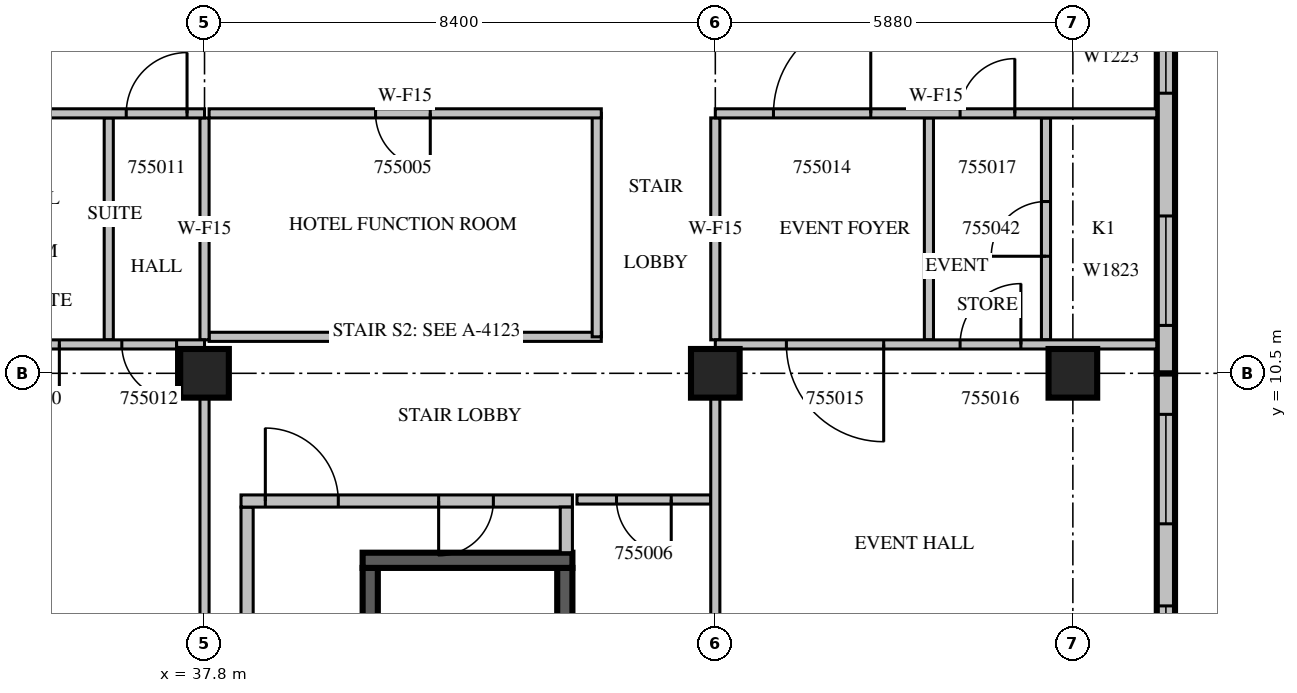
"""IFC4 building model, lengths in metres.
Left out: names, types, materials, properties, quantities, classifications, styles, units other than length and angle.
Written with IfcOpenShell. Run it as: python <this file> out.ifc"""

import sys

from ifc_helpers import new_model, si_unit, direction, frame, frame_2d, origin, origin_2d, place, context, subcontext, project, spatial, rectangle, extrude, source, transform, mapped, element, fill, save


model = new_model("IFC4")
c1 = context("Model", 3, precision=1e-05, world=origin(), true_north=direction((0.0, 1.0)))
c2 = subcontext(c1, "Body", "Model", "MODEL_VIEW")
j1 = project(units=[si_unit("LENGTHUNIT", "METRE"), si_unit("PLANEANGLEUNIT", "RADIAN")], contexts=[c1])
p1 = place(None, origin())
s1 = spatial("IfcSite", under=j1, at=p1, CompositionType="ELEMENT")
p2 = place(p1, origin())
s2 = spatial("IfcBuilding", under=s1, at=p2, CompositionType="ELEMENT")
p3 = place(p2, frame((0.0, 0.0, 242.4)))
s3 = spatial("IfcBuildingStorey", under=s2, at=p3, CompositionType="ELEMENT", Elevation=242.4)
m1 = source(origin(), c2, "Body", "SweptSolid", [
    extrude(rectangle(XDim=0.8, YDim=0.8, at=origin_2d()), origin(), (0.0, 0.0, 1.0), 3.8),
])
for number, where, z_axis, x_axis in (
    (1, (37.8, 10.5, 0.0), (0.0, 0.0, 1.0), (1.0, 0.0, 0.0)),
    (2, (46.2, 10.5, 0.0), (0.0, 0.0, 1.0), (1.0, 0.0, 0.0)),
    (3, (52.08, 10.5, 0.0), (0.0, 0.0, 1.0), (1.0, 0.0, 0.0)),
):
    element("IfcColumn", number, at=place(p3, frame(where, z_axis=z_axis, x_axis=x_axis)), inside=s3, PredefinedType="COLUMN", context=c2, shape_type="MappedRepresentation", body=[
        mapped(m1, transform((0.0, 0.0, 0.0), scale=1.0)),
    ])
m2 = source(origin(), c2, "Body", "SweptSolid", [
    extrude(rectangle(XDim=6.3, YDim=0.3, at=frame_2d((3.15, 0.0))), origin(), (0.0, 0.0, 1.0), 3.4),
])
p4 = place(p3, frame((53.61, 4.2, 0.0), z_axis=(0.0, 0.0, 1.0), x_axis=(0.0, 1.0, 0.0)))
e4 = element("IfcWall", 4, at=p4, inside=s3, PredefinedType="STANDARD", context=c2, shape_type="MappedRepresentation", body=[
    mapped(m2, transform((0.0, 0.0, 0.0), scale=1.0)),
])
m3 = source(origin(), c2, "Body", "SweptSolid", [
    extrude(rectangle(XDim=1.8, YDim=2.3, at=frame_2d((0.9, 1.15))), frame((0.0, 0.16, 0.0), z_axis=(0.0, -1.0, 0.0), x_axis=(1.0, 0.0, 0.0)), (0.0, 0.0, 1.0), 0.32),
])
p5 = place(p4, frame((0.675, 0.0, 0.6)))
e5 = element("IfcOpeningElement", 5, at=p5, cuts=e4, PredefinedType="OPENING", context=c2, shape_type="MappedRepresentation", body=[
    mapped(m3, transform((0.0, 0.0, 0.0), scale=1.0)),
])
p6 = place(p4, frame((3.825, 0.0, 0.6)))
e6 = element("IfcOpeningElement", 6, at=p6, cuts=e4, PredefinedType="OPENING", context=c2, shape_type="MappedRepresentation", body=[
    mapped(m3, transform((0.0, 0.0, 0.0), scale=1.0)),
])
m4 = source(origin(), c2, "Body", "SweptSolid", [
    extrude(rectangle(XDim=6.75, YDim=0.3, at=frame_2d((3.375, 0.0))), origin(), (0.0, 0.0, 1.0), 3.4),
])
p7 = place(p3, frame((53.61, 10.5, 0.0), z_axis=(0.0, 0.0, 1.0), x_axis=(0.0, 1.0, 0.0)))
e7 = element("IfcWall", 7, at=p7, inside=s3, PredefinedType="STANDARD", context=c2, shape_type="MappedRepresentation", body=[
    mapped(m4, transform((0.0, 0.0, 0.0), scale=1.0)),
])
p8 = place(p7, frame((0.787, 0.0, 0.6)))
e8 = element("IfcOpeningElement", 8, at=p8, cuts=e7, PredefinedType="OPENING", context=c2, shape_type="MappedRepresentation", body=[
    mapped(m3, transform((0.0, 0.0, 0.0), scale=1.0)),
])
m5 = source(origin(), c2, "Body", "SweptSolid", [
    extrude(rectangle(XDim=1.2, YDim=2.3, at=frame_2d((0.6, 1.15))), frame((0.0, 0.16, 0.0), z_axis=(0.0, -1.0, 0.0), x_axis=(1.0, 0.0, 0.0)), (0.0, 0.0, 1.0), 0.32),
])
p9 = place(p7, frame((4.606, 0.0, 0.6)))
e9 = element("IfcOpeningElement", 9, at=p9, cuts=e7, PredefinedType="OPENING", context=c2, shape_type="MappedRepresentation", body=[
    mapped(m5, transform((0.0, 0.0, 0.0), scale=1.0)),
])
m6 = source(origin(), c2, "Body", "SweptSolid", [
    extrude(rectangle(XDim=7.0, YDim=0.25, at=frame_2d((3.5, 0.0))), origin(), (0.0, 0.0, 1.0), 3.4),
])
p10 = place(p3, frame((40.525, 0.3, 0.0), z_axis=(0.0, 0.0, 1.0), x_axis=(0.0, 1.0, 0.0)))
e10 = element("IfcWall", 10, at=p10, inside=s3, PredefinedType="SOLIDWALL", context=c2, shape_type="MappedRepresentation", body=[
    mapped(m6, transform((0.0, 0.0, 0.0), scale=1.0)),
])
m7 = source(origin(), c2, "Body", "SweptSolid", [
    extrude(rectangle(XDim=1.1, YDim=2.1, at=frame_2d((0.55, 1.05))), frame((0.0, 0.135, 0.0), z_axis=(0.0, -1.0, 0.0), x_axis=(1.0, 0.0, 0.0)), (0.0, 0.0, 1.0), 0.27),
])
p11 = place(p10, frame((0.55, 0.0, 0.0)))
e11 = element("IfcOpeningElement", 11, at=p11, cuts=e10, PredefinedType="OPENING", context=c2, shape_type="MappedRepresentation", body=[
    mapped(m7, transform((0.0, 0.0, 0.0), scale=1.0)),
])
p12 = place(p3, frame((43.725, 0.3, 0.0), z_axis=(0.0, 0.0, 1.0), x_axis=(0.0, 1.0, 0.0)))
e12 = element("IfcWall", 12, at=p12, inside=s3, PredefinedType="SOLIDWALL", context=c2, shape_type="MappedRepresentation", body=[
    mapped(m6, transform((0.0, 0.0, 0.0), scale=1.0)),
])
m8 = source(origin(), c2, "Body", "SweptSolid", [
    extrude(rectangle(XDim=3.45, YDim=0.25, at=frame_2d((1.725, 0.0))), origin(), (0.0, 0.0, 1.0), 3.4),
])
p13 = place(p3, frame((40.4, 7.425, 0.0), z_axis=(0.0, 0.0, 1.0), x_axis=(1.0, 0.0, 0.0)))
e13 = element("IfcWall", 13, at=p13, inside=s3, PredefinedType="SOLIDWALL", context=c2, shape_type="MappedRepresentation", body=[
    mapped(m8, transform((0.0, 0.0, 0.0), scale=1.0)),
])
m9 = source(origin(), c2, "Body", "SweptSolid", [
    extrude(rectangle(XDim=8.0, YDim=0.2, at=frame_2d((4.0, 0.0))), origin(), (0.0, 0.0, 1.0), 3.4),
])
p14 = place(p3, frame((38.5, 0.3, 0.0), z_axis=(0.0, 0.0, 1.0), x_axis=(0.0, 1.0, 0.0)))
e14 = element("IfcWall", 14, at=p14, inside=s3, PredefinedType="PARTITIONING", context=c2, shape_type="MappedRepresentation", body=[
    mapped(m9, transform((0.0, 0.0, 0.0), scale=1.0)),
])
m10 = source(origin(), c2, "Body", "SweptSolid", [
    extrude(rectangle(XDim=5.45, YDim=0.2, at=frame_2d((2.725, 0.0))), origin(), (0.0, 0.0, 1.0), 3.4),
])
p15 = place(p3, frame((38.4, 8.4, 0.0), z_axis=(0.0, 0.0, 1.0), x_axis=(1.0, 0.0, 0.0)))
e15 = element("IfcWall", 15, at=p15, inside=s3, PredefinedType="PARTITIONING", context=c2, shape_type="MappedRepresentation", body=[
    mapped(m10, transform((0.0, 0.0, 0.0), scale=1.0)),
])
m11 = source(origin(), c2, "Body", "SweptSolid", [
    extrude(rectangle(XDim=1.2, YDim=2.1, at=frame_2d((0.6, 1.05))), frame((0.0, 0.11, 0.0), z_axis=(0.0, -1.0, 0.0), x_axis=(1.0, 0.0, 0.0)), (0.0, 0.0, 1.0), 0.22),
])
p16 = place(p15, frame((0.4, 0.0, 0.0)))
e16 = element("IfcOpeningElement", 16, at=p16, cuts=e15, PredefinedType="OPENING", context=c2, shape_type="MappedRepresentation", body=[
    mapped(m11, transform((0.0, 0.0, 0.0), scale=1.0)),
])
m12 = source(origin(), c2, "Body", "SweptSolid", [
    extrude(rectangle(XDim=0.9, YDim=2.1, at=frame_2d((0.45, 1.05))), frame((0.0, 0.11, 0.0), z_axis=(0.0, -1.0, 0.0), x_axis=(1.0, 0.0, 0.0)), (0.0, 0.0, 1.0), 0.22),
])
p17 = place(p15, frame((3.25, 0.0, 0.0)))
e17 = element("IfcOpeningElement", 17, at=p17, cuts=e15, PredefinedType="OPENING", context=c2, shape_type="MappedRepresentation", body=[
    mapped(m12, transform((0.0, 0.0, 0.0), scale=1.0)),
])
m13 = source(origin(), c2, "Body", "SweptSolid", [
    extrude(rectangle(XDim=0.75, YDim=0.2, at=frame_2d((0.375, 0.0))), origin(), (0.0, 0.0, 1.0), 3.4),
])
p18 = place(p3, frame((43.75, 7.55, 0.0), z_axis=(0.0, 0.0, 1.0), x_axis=(0.0, 1.0, 0.0)))
e18 = element("IfcWall", 18, at=p18, inside=s3, PredefinedType="PARTITIONING", context=c2, shape_type="MappedRepresentation", body=[
    mapped(m13, transform((0.0, 0.0, 0.0), scale=1.0)),
])
m14 = source(origin(), c2, "Body", "SweptSolid", [
    extrude(rectangle(XDim=6.45, YDim=0.15, at=frame_2d((3.225, 0.0))), origin(), (0.0, 0.0, 1.0), 3.4),
])
p19 = place(p3, frame((37.875, 11.1, 0.0), z_axis=(0.0, 0.0, 1.0), x_axis=(1.0, 0.0, 0.0)))
e19 = element("IfcWall", 19, at=p19, inside=s3, PredefinedType="PARTITIONING", context=c2, shape_type="MappedRepresentation", body=[
    mapped(m14, transform((0.0, 0.0, 0.0), scale=1.0)),
])
m15 = source(origin(), c2, "Body", "SweptSolid", [
    extrude(rectangle(XDim=3.675, YDim=0.15, at=frame_2d((1.837, 0.0))), origin(), (0.0, 0.0, 1.0), 3.4),
])
p20 = place(p3, frame((44.25, 11.1, 0.0), z_axis=(0.0, 0.0, 1.0), x_axis=(0.0, 1.0, 0.0)))
e20 = element("IfcWall", 20, at=p20, inside=s3, PredefinedType="PARTITIONING", context=c2, shape_type="MappedRepresentation", body=[
    mapped(m15, transform((0.0, 0.0, 0.0), scale=1.0)),
])
p21 = place(p3, frame((44.325, 14.775, 0.0), z_axis=(0.0, 0.0, 1.0), x_axis=(-1.0, 0.0, 0.0)))
e21 = element("IfcWall", 21, at=p21, inside=s3, PredefinedType="PARTITIONING", context=c2, shape_type="MappedRepresentation", body=[
    mapped(m14, transform((0.0, 0.0, 0.0), scale=1.0)),
])
m16 = source(origin(), c2, "Body", "SweptSolid", [
    extrude(rectangle(XDim=0.9, YDim=2.1, at=frame_2d((0.45, 1.05))), frame((0.0, 0.085, 0.0), z_axis=(0.0, -1.0, 0.0), x_axis=(1.0, 0.0, 0.0)), (0.0, 0.0, 1.0), 0.17),
])
p22 = place(p21, frame((2.812, 0.0, 0.0)))
e22 = element("IfcOpeningElement", 22, at=p22, cuts=e21, PredefinedType="OPENING", context=c2, shape_type="MappedRepresentation", body=[
    mapped(m16, transform((0.0, 0.0, 0.0), scale=1.0)),
])
m17 = source(origin(), c2, "Body", "SweptSolid", [
    extrude(rectangle(XDim=2.2, YDim=0.15, at=frame_2d((1.1, 0.0))), origin(), (0.0, 0.0, 1.0), 3.4),
])
p23 = place(p3, frame((46.125, 8.425, 0.0), z_axis=(0.0, 0.0, 1.0), x_axis=(-1.0, 0.0, 0.0)))
e23 = element("IfcWall", 23, at=p23, inside=s3, PredefinedType="PARTITIONING", context=c2, shape_type="MappedRepresentation", body=[
    mapped(m17, transform((0.0, 0.0, 0.0), scale=1.0)),
])
p24 = place(p23, frame((0.65, 0.0, 0.0)))
e24 = element("IfcOpeningElement", 24, at=p24, cuts=e23, PredefinedType="OPENING", context=c2, shape_type="MappedRepresentation", body=[
    mapped(m16, transform((0.0, 0.0, 0.0), scale=1.0)),
])
m18 = source(origin(), c2, "Body", "SweptSolid", [
    extrude(rectangle(XDim=3.65, YDim=0.15, at=frame_2d((1.825, 0.0))), origin(), (0.0, 0.0, 1.0), 3.4),
])
p25 = place(p3, frame((36.225, 11.05, 0.0), z_axis=(0.0, 0.0, 1.0), x_axis=(0.0, 1.0, 0.0)))
e25 = element("IfcWall", 25, at=p25, inside=s3, PredefinedType="PARTITIONING", context=c2, shape_type="MappedRepresentation", body=[
    mapped(m18, transform((0.0, 0.0, 0.0), scale=1.0)),
])
m19 = source(origin(), c2, "Body", "SweptSolid", [
    extrude(rectangle(XDim=9.302, YDim=0.15, at=frame_2d((4.651, 0.0))), origin(), (0.0, 0.0, 1.0), 3.4),
])
p26 = place(p3, frame((37.8, 0.799, 0.0), z_axis=(0.0, 0.0, 1.0), x_axis=(0.0, 1.0, 0.0)))
e26 = element("IfcWall", 26, at=p26, inside=s3, PredefinedType="PARTITIONING", context=c2, shape_type="MappedRepresentation", body=[
    mapped(m19, transform((0.0, 0.0, 0.0), scale=1.0)),
])
p27 = place(p3, frame((37.8, 11.05, 0.0), z_axis=(0.0, 0.0, 1.0), x_axis=(0.0, 1.0, 0.0)))
e27 = element("IfcWall", 27, at=p27, inside=s3, PredefinedType="PARTITIONING", context=c2, shape_type="MappedRepresentation", body=[
    mapped(m18, transform((0.0, 0.0, 0.0), scale=1.0)),
])
m20 = source(origin(), c2, "Body", "SweptSolid", [
    extrude(rectangle(XDim=8.4, YDim=0.15, at=frame_2d((4.2, 0.0))), origin(), (0.0, 0.0, 1.0), 3.4),
])
p28 = place(p3, frame((37.8, 10.975, 0.0), z_axis=(0.0, 0.0, 1.0), x_axis=(-1.0, 0.0, 0.0)))
e28 = element("IfcWall", 28, at=p28, inside=s3, PredefinedType="PARTITIONING", context=c2, shape_type="MappedRepresentation", body=[
    mapped(m20, transform((0.0, 0.0, 0.0), scale=1.0)),
])
p29 = place(p28, frame((7.0, 0.0, 0.0)))
e29 = element("IfcOpeningElement", 29, at=p29, cuts=e28, PredefinedType="OPENING", context=c2, shape_type="MappedRepresentation", body=[
    mapped(m16, transform((0.0, 0.0, 0.0), scale=1.0)),
])
p30 = place(p28, frame((5.013, 0.0, 0.0)))
e30 = element("IfcOpeningElement", 30, at=p30, cuts=e28, PredefinedType="OPENING", context=c2, shape_type="MappedRepresentation", body=[
    mapped(m16, transform((0.0, 0.0, 0.0), scale=1.0)),
])
p31 = place(p28, frame((2.388, 0.0, 0.0)))
e31 = element("IfcOpeningElement", 31, at=p31, cuts=e28, PredefinedType="OPENING", context=c2, shape_type="MappedRepresentation", body=[
    mapped(m16, transform((0.0, 0.0, 0.0), scale=1.0)),
])
p32 = place(p28, frame((0.46, 0.0, 0.0)))
e32 = element("IfcOpeningElement", 32, at=p32, cuts=e28, PredefinedType="OPENING", context=c2, shape_type="MappedRepresentation", body=[
    mapped(m16, transform((0.0, 0.0, 0.0), scale=1.0)),
])
p33 = place(p3, frame((49.713, 11.05, 0.0), z_axis=(0.0, 0.0, 1.0), x_axis=(0.0, 1.0, 0.0)))
e33 = element("IfcWall", 33, at=p33, inside=s3, PredefinedType="PARTITIONING", context=c2, shape_type="MappedRepresentation", body=[
    mapped(m18, transform((0.0, 0.0, 0.0), scale=1.0)),
])
p34 = place(p3, frame((51.638, 11.05, 0.0), z_axis=(0.0, 0.0, 1.0), x_axis=(0.0, 1.0, 0.0)))
e34 = element("IfcWall", 34, at=p34, inside=s3, PredefinedType="PARTITIONING", context=c2, shape_type="MappedRepresentation", body=[
    mapped(m18, transform((0.0, 0.0, 0.0), scale=1.0)),
])
p35 = place(p34, frame((1.375, 0.0, 0.0)))
e35 = element("IfcOpeningElement", 35, at=p35, cuts=e34, PredefinedType="OPENING", context=c2, shape_type="MappedRepresentation", body=[
    mapped(m16, transform((0.0, 0.0, 0.0), scale=1.0)),
])
p36 = place(p3, frame((46.2, 0.799, 0.0), z_axis=(0.0, 0.0, 1.0), x_axis=(0.0, 1.0, 0.0)))
e36 = element("IfcWall", 36, at=p36, inside=s3, PredefinedType="PARTITIONING", context=c2, shape_type="MappedRepresentation", body=[
    mapped(m19, transform((0.0, 0.0, 0.0), scale=1.0)),
])
p37 = place(p3, frame((46.2, 11.05, 0.0), z_axis=(0.0, 0.0, 1.0), x_axis=(0.0, 1.0, 0.0)))
e37 = element("IfcWall", 37, at=p37, inside=s3, PredefinedType="PARTITIONING", context=c2, shape_type="MappedRepresentation", body=[
    mapped(m18, transform((0.0, 0.0, 0.0), scale=1.0)),
])
m21 = source(origin(), c2, "Body", "SweptSolid", [
    extrude(rectangle(XDim=7.26, YDim=0.15, at=frame_2d((3.63, 0.0))), origin(), (0.0, 0.0, 1.0), 3.4),
])
p38 = place(p3, frame((53.46, 10.975, 0.0), z_axis=(0.0, 0.0, 1.0), x_axis=(-1.0, 0.0, 0.0)))
e38 = element("IfcWall", 38, at=p38, inside=s3, PredefinedType="PARTITIONING", context=c2, shape_type="MappedRepresentation", body=[
    mapped(m21, transform((0.0, 0.0, 0.0), scale=1.0)),
])
m22 = source(origin(), c2, "Body", "SweptSolid", [
    extrude(rectangle(XDim=1.6, YDim=2.1, at=frame_2d((0.8, 1.05))), frame((0.0, 0.085, 0.0), z_axis=(0.0, -1.0, 0.0), x_axis=(1.0, 0.0, 0.0)), (0.0, 0.0, 1.0), 0.17),
])
p39 = place(p38, frame((4.491, 0.0, 0.0)))
e39 = element("IfcOpeningElement", 39, at=p39, cuts=e38, PredefinedType="OPENING", context=c2, shape_type="MappedRepresentation", body=[
    mapped(m22, transform((0.0, 0.0, 0.0), scale=1.0)),
])
m23 = source(origin(), c2, "Body", "SweptSolid", [
    extrude(rectangle(XDim=1.0, YDim=2.1, at=frame_2d((0.5, 1.05))), frame((0.0, 0.085, 0.0), z_axis=(0.0, -1.0, 0.0), x_axis=(1.0, 0.0, 0.0)), (0.0, 0.0, 1.0), 0.17),
])
p40 = place(p38, frame((2.235, 0.0, 0.0)))
e40 = element("IfcOpeningElement", 40, at=p40, cuts=e38, PredefinedType="OPENING", context=c2, shape_type="MappedRepresentation", body=[
    mapped(m23, transform((0.0, 0.0, 0.0), scale=1.0)),
])
p41 = place(p3, frame((37.8, 14.775, 0.0), z_axis=(0.0, 0.0, 1.0), x_axis=(-1.0, 0.0, 0.0)))
e41 = element("IfcWall", 41, at=p41, inside=s3, PredefinedType="PARTITIONING", context=c2, shape_type="MappedRepresentation", body=[
    mapped(m20, transform((0.0, 0.0, 0.0), scale=1.0)),
])
p42 = place(p41, frame((7.112, 0.0, 0.0)))
e42 = element("IfcOpeningElement", 42, at=p42, cuts=e41, PredefinedType="OPENING", context=c2, shape_type="MappedRepresentation", body=[
    mapped(m23, transform((0.0, 0.0, 0.0), scale=1.0)),
])
p43 = place(p41, frame((0.287, 0.0, 0.0)))
e43 = element("IfcOpeningElement", 43, at=p43, cuts=e41, PredefinedType="OPENING", context=c2, shape_type="MappedRepresentation", body=[
    mapped(m23, transform((0.0, 0.0, 0.0), scale=1.0)),
])
p44 = place(p3, frame((53.46, 14.775, 0.0), z_axis=(0.0, 0.0, 1.0), x_axis=(-1.0, 0.0, 0.0)))
e44 = element("IfcWall", 44, at=p44, inside=s3, PredefinedType="PARTITIONING", context=c2, shape_type="MappedRepresentation", body=[
    mapped(m21, transform((0.0, 0.0, 0.0), scale=1.0)),
])
p45 = place(p44, frame((4.704, 0.0, 0.0)))
e45 = element("IfcOpeningElement", 45, at=p45, cuts=e44, PredefinedType="OPENING", context=c2, shape_type="MappedRepresentation", body=[
    mapped(m22, transform((0.0, 0.0, 0.0), scale=1.0)),
])
p46 = place(p44, frame((2.335, 0.0, 0.0)))
e46 = element("IfcOpeningElement", 46, at=p46, cuts=e44, PredefinedType="OPENING", context=c2, shape_type="MappedRepresentation", body=[
    mapped(m16, transform((0.0, 0.0, 0.0), scale=1.0)),
])
m24 = source(origin(), c2, "Body", "SweptSolid", [
    extrude(rectangle(XDim=1.8, YDim=2.3, at=frame_2d((0.9, 1.15))), frame((0.0, 0.03, 0.0), z_axis=(0.0, -1.0, 0.0), x_axis=(1.0, 0.0, 0.0)), (0.0, 0.0, 1.0), 0.06),
])
p47 = place(p5, origin())
e47 = element("IfcWindow", 47, at=p47, inside=s3, PartitioningType="SINGLE_PANEL", PredefinedType="WINDOW", context=c2, shape_type="MappedRepresentation", body=[
    mapped(m24, transform((0.0, 0.0, 0.0), scale=1.0)),
])
fill(e5, e47)
p48 = place(p6, origin())
e48 = element("IfcWindow", 48, at=p48, inside=s3, PartitioningType="SINGLE_PANEL", PredefinedType="WINDOW", context=c2, shape_type="MappedRepresentation", body=[
    mapped(m24, transform((0.0, 0.0, 0.0), scale=1.0)),
])
fill(e6, e48)
p49 = place(p8, origin())
e49 = element("IfcWindow", 49, at=p49, inside=s3, PartitioningType="SINGLE_PANEL", PredefinedType="WINDOW", context=c2, shape_type="MappedRepresentation", body=[
    mapped(m24, transform((0.0, 0.0, 0.0), scale=1.0)),
])
fill(e8, e49)
m25 = source(origin(), c2, "Body", "SweptSolid", [
    extrude(rectangle(XDim=1.2, YDim=2.3, at=frame_2d((0.6, 1.15))), frame((0.0, 0.03, 0.0), z_axis=(0.0, -1.0, 0.0), x_axis=(1.0, 0.0, 0.0)), (0.0, 0.0, 1.0), 0.06),
])
p50 = place(p9, origin())
e50 = element("IfcWindow", 50, at=p50, inside=s3, PartitioningType="SINGLE_PANEL", PredefinedType="WINDOW", context=c2, shape_type="MappedRepresentation", body=[
    mapped(m25, transform((0.0, 0.0, 0.0), scale=1.0)),
])
fill(e9, e50)
m26 = source(origin(), c2, "Body", "SweptSolid", [
    extrude(rectangle(XDim=1.2, YDim=2.1, at=frame_2d((0.6, 1.05))), frame((0.0, 0.025, 0.0), z_axis=(0.0, -1.0, 0.0), x_axis=(1.0, 0.0, 0.0)), (0.0, 0.0, 1.0), 0.05),
])
p51 = place(p16, origin())
e51 = element("IfcDoor", 51, at=p51, inside=s3, OperationType="SINGLE_SWING_LEFT", PredefinedType="DOOR", context=c2, shape_type="MappedRepresentation", body=[
    mapped(m26, transform((0.0, 0.0, 0.0), scale=1.0)),
])
fill(e16, e51)
m27 = source(origin(), c2, "Body", "SweptSolid", [
    extrude(rectangle(XDim=0.9, YDim=2.1, at=frame_2d((0.45, 1.05))), frame((0.0, 0.025, 0.0), z_axis=(0.0, -1.0, 0.0), x_axis=(1.0, 0.0, 0.0)), (0.0, 0.0, 1.0), 0.05),
])
p52 = place(p17, origin())
e52 = element("IfcDoor", 52, at=p52, inside=s3, OperationType="SINGLE_SWING_RIGHT", PredefinedType="DOOR", context=c2, shape_type="MappedRepresentation", body=[
    mapped(m27, transform((0.0, 0.0, 0.0), scale=1.0)),
])
fill(e17, e52)
p53 = place(p22, origin())
e53 = element("IfcDoor", 53, at=p53, inside=s3, OperationType="SINGLE_SWING_LEFT", PredefinedType="DOOR", context=c2, shape_type="MappedRepresentation", body=[
    mapped(m27, transform((0.0, 0.0, 0.0), scale=1.0)),
])
fill(e22, e53)
p54 = place(p24, origin())
e54 = element("IfcDoor", 54, at=p54, inside=s3, OperationType="SINGLE_SWING_LEFT", PredefinedType="DOOR", context=c2, shape_type="MappedRepresentation", body=[
    mapped(m27, transform((0.0, 0.0, 0.0), scale=1.0)),
])
fill(e24, e54)
p55 = place(p31, origin())
e55 = element("IfcDoor", 55, at=p55, inside=s3, OperationType="SINGLE_SWING_LEFT", PredefinedType="DOOR", context=c2, shape_type="MappedRepresentation", body=[
    mapped(m27, transform((0.0, 0.0, 0.0), scale=1.0)),
])
fill(e31, e55)
m28 = source(origin(), c2, "Body", "SweptSolid", [
    extrude(rectangle(XDim=1.0, YDim=2.1, at=frame_2d((0.5, 1.05))), frame((0.0, 0.025, 0.0), z_axis=(0.0, -1.0, 0.0), x_axis=(1.0, 0.0, 0.0)), (0.0, 0.0, 1.0), 0.05),
])
p56 = place(p43, origin())
e56 = element("IfcDoor", 56, at=p56, inside=s3, OperationType="SINGLE_SWING_RIGHT", PredefinedType="DOOR", context=c2, shape_type="MappedRepresentation", body=[
    mapped(m28, transform((0.0, 0.0, 0.0), scale=1.0)),
])
fill(e43, e56)
p57 = place(p32, origin())
e57 = element("IfcDoor", 57, at=p57, inside=s3, OperationType="SINGLE_SWING_LEFT", PredefinedType="DOOR", context=c2, shape_type="MappedRepresentation", body=[
    mapped(m27, transform((0.0, 0.0, 0.0), scale=1.0)),
])
fill(e32, e57)
m29 = source(origin(), c2, "Body", "SweptSolid", [
    extrude(rectangle(XDim=1.6, YDim=2.1, at=frame_2d((0.8, 1.05))), frame((0.0, 0.025, 0.0), z_axis=(0.0, -1.0, 0.0), x_axis=(1.0, 0.0, 0.0)), (0.0, 0.0, 1.0), 0.05),
])
p58 = place(p45, origin())
e58 = element("IfcDoor", 58, at=p58, inside=s3, OperationType="SINGLE_SWING_RIGHT", PredefinedType="DOOR", context=c2, shape_type="MappedRepresentation", body=[
    mapped(m29, transform((0.0, 0.0, 0.0), scale=1.0)),
])
fill(e45, e58)
p59 = place(p39, origin())
e59 = element("IfcDoor", 59, at=p59, inside=s3, OperationType="SINGLE_SWING_LEFT", PredefinedType="DOOR", context=c2, shape_type="MappedRepresentation", body=[
    mapped(m29, transform((0.0, 0.0, 0.0), scale=1.0)),
])
fill(e39, e59)
p60 = place(p40, origin())
e60 = element("IfcDoor", 60, at=p60, inside=s3, OperationType="SINGLE_SWING_RIGHT", PredefinedType="DOOR", context=c2, shape_type="MappedRepresentation", body=[
    mapped(m28, transform((0.0, 0.0, 0.0), scale=1.0)),
])
fill(e40, e60)
p61 = place(p46, origin())
e61 = element("IfcDoor", 61, at=p61, inside=s3, OperationType="SINGLE_SWING_RIGHT", PredefinedType="DOOR", context=c2, shape_type="MappedRepresentation", body=[
    mapped(m27, transform((0.0, 0.0, 0.0), scale=1.0)),
])
fill(e46, e61)
p62 = place(p35, origin())
e62 = element("IfcDoor", 62, at=p62, inside=s3, OperationType="SINGLE_SWING_LEFT", PredefinedType="DOOR", context=c2, shape_type="MappedRepresentation", body=[
    mapped(m27, transform((0.0, 0.0, 0.0), scale=1.0)),
])
fill(e35, e62)
save(model, sys.argv[1])
